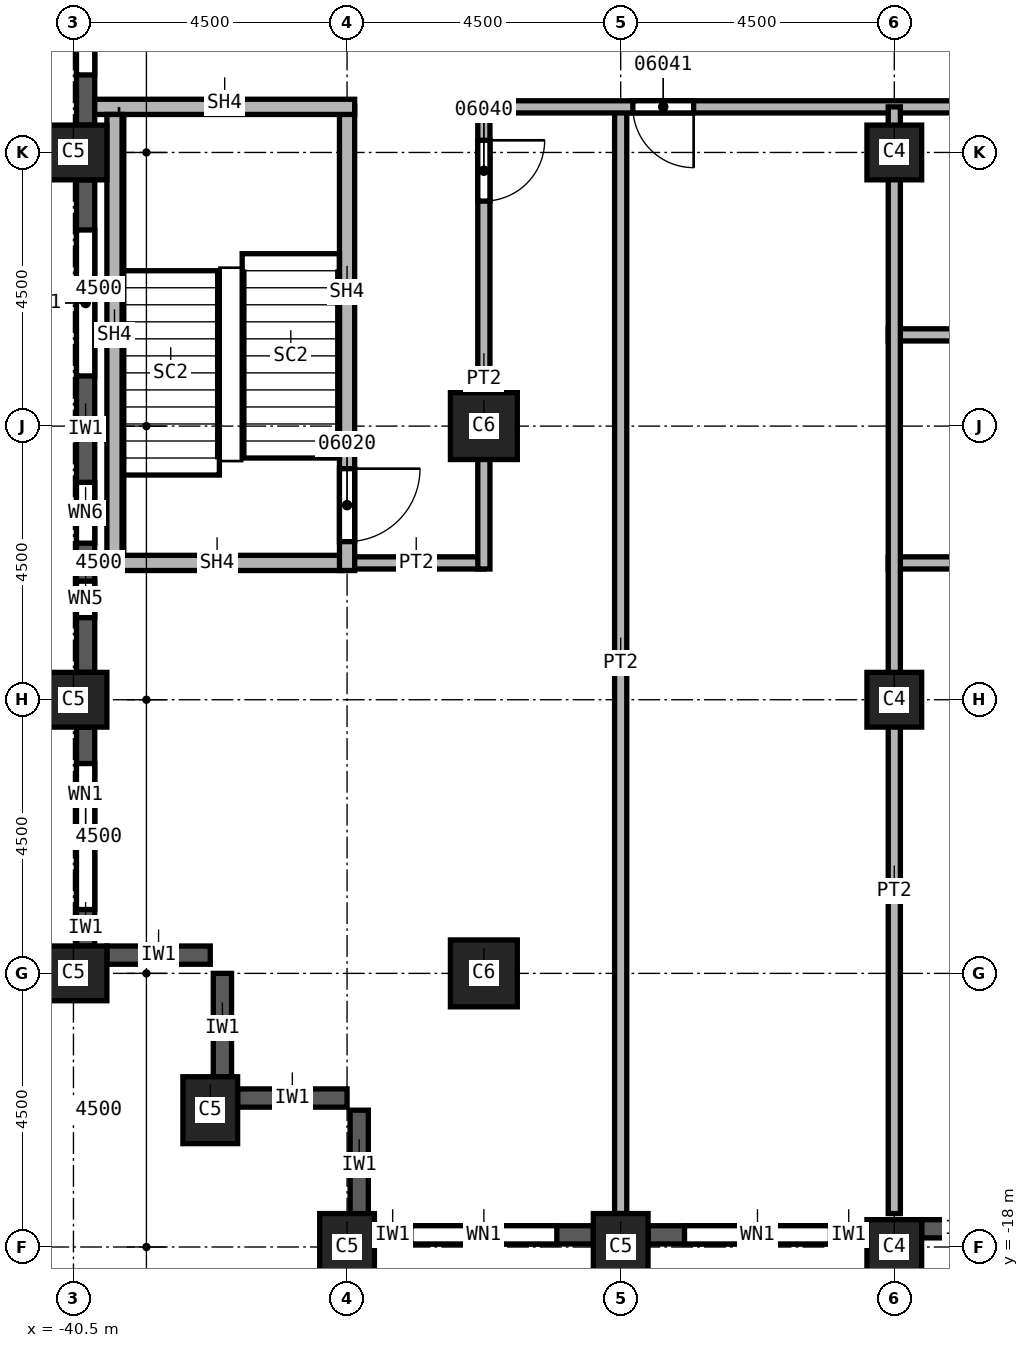
"""IFC4 building model, lengths in metres.
Left out: names, types, materials, properties, quantities, classifications, styles, units other than length and angle.
Written with IfcOpenShell. Run it as: python <this file> out.ifc"""

import sys

from ifc_helpers import new_model, si_unit, direction, frame, frame_2d, origin, origin_2d, place, context, subcontext, project, spatial, rectangle, extrude, element, fill, save


model = new_model("IFC4")
c1 = context("Model", 3, precision=1e-05, world=origin(), true_north=direction((0.0, 1.0)))
c2 = subcontext(c1, "Body", "Model", "MODEL_VIEW")
j1 = project(units=[si_unit("LENGTHUNIT", "METRE"), si_unit("PLANEANGLEUNIT", "RADIAN")], contexts=[c1])
p1 = place(None, origin())
s1 = spatial("IfcSite", under=j1, at=p1, CompositionType="ELEMENT")
p2 = place(p1, origin())
s2 = spatial("IfcBuilding", under=s1, at=p2, CompositionType="ELEMENT")
p3 = place(p2, frame((0.0, 0.0, 126.0)))
s3 = spatial("IfcBuildingStorey", under=s2, at=p3, CompositionType="ELEMENT", Elevation=126.0)
for number, where, z_axis, x_axis in (
    (1, (-40.5, 0.0, 0.0), (0.0, 0.0, 1.0), (0.0, 1.0, 0.0)),
    (2, (-40.5, -9.0, 0.0), (0.0, 0.0, 1.0), (0.0, 1.0, 0.0)),
    (3, (-40.5, -13.5, 0.0), (0.0, 0.0, 1.0), (0.0, 1.0, 0.0)),
    (4, (-38.25, -15.75, 0.0), (0.0, 0.0, 1.0), (1.0, 0.0, 0.0)),
    (5, (-31.5, -18.0, 0.0), (0.0, 0.0, 1.0), (1.0, 0.0, 0.0)),
    (6, (-36.0, -18.0, 0.0), (0.0, 0.0, 1.0), (1.0, 0.0, 0.0)),
):
    element("IfcColumn", number, at=place(p3, frame(where, z_axis=z_axis, x_axis=x_axis)), inside=s3, PredefinedType="COLUMN", context=c2, shape_type="SweptSolid", body=[
        extrude(rectangle(XDim=0.9, YDim=1.1, at=origin_2d()), origin(), (0.0, 0.0, 1.0), 3.7),
    ])
for number, where, z_axis, x_axis in (
    (7, (-33.75, -4.5, 0.0), (0.0, 0.0, 1.0), (1.0, 0.0, 0.0)),
    (8, (-33.75, -13.5, 0.0), (0.0, 0.0, 1.0), (1.0, 0.0, 0.0)),
):
    element("IfcColumn", number, at=place(p3, frame(where, z_axis=z_axis, x_axis=x_axis)), inside=s3, PredefinedType="COLUMN", context=c2, shape_type="SweptSolid", body=[
        extrude(rectangle(XDim=1.1, YDim=1.1, at=origin_2d()), origin(), (0.0, 0.0, 1.0), 3.7),
    ])
for number, where, z_axis, x_axis in (
    (9, (-27.0, 0.0, 0.0), (0.0, 0.0, 1.0), (1.0, 0.0, 0.0)),
    (10, (-27.0, -9.0, 0.0), (0.0, 0.0, 1.0), (1.0, 0.0, 0.0)),
    (11, (-27.0, -18.0, 0.0), (0.0, 0.0, 1.0), (1.0, 0.0, 0.0)),
):
    element("IfcColumn", number, at=place(p3, frame(where, z_axis=z_axis, x_axis=x_axis)), inside=s3, PredefinedType="COLUMN", context=c2, shape_type="SweptSolid", body=[
        extrude(rectangle(XDim=0.9, YDim=0.9, at=origin_2d()), origin(), (0.0, 0.0, 1.0), 3.7),
    ])
p4 = place(p3, frame((-39.95, -13.2, 0.0), z_axis=(0.0, 0.0, 1.0), x_axis=(1.0, 0.0, 0.0)))
e12 = element("IfcWall", 12, at=p4, inside=s3, PredefinedType="SOLIDWALL", context=c2, shape_type="SweptSolid", body=[
    extrude(rectangle(XDim=1.7, YDim=0.3, at=frame_2d((0.85, 0.0))), origin(), (0.0, 0.0, 1.0), 3.1),
])
for number, where, z_axis, x_axis in (
    (13, (-38.05, -15.3, 0.0), (0.0, 0.0, 1.0), (0.0, 1.0, 0.0)),
    (14, (-37.8, -15.55, 0.0), (0.0, 0.0, 1.0), (1.0, 0.0, 0.0)),
    (15, (-35.8, -17.55, 0.0), (0.0, 0.0, 1.0), (0.0, 1.0, 0.0)),
):
    element("IfcWall", number, at=place(p3, frame(where, z_axis=z_axis, x_axis=x_axis)), inside=s3, PredefinedType="SOLIDWALL", context=c2, shape_type="SweptSolid", body=[
        extrude(rectangle(XDim=1.8, YDim=0.3, at=frame_2d((0.9, 0.0))), origin(), (0.0, 0.0, 1.0), 3.1),
    ])
p5 = place(p3, frame((-40.3, 8.55, 0.0), z_axis=(0.0, 0.0, 1.0), x_axis=(0.0, -1.0, 0.0)))
e16 = element("IfcWall", 16, at=p5, inside=s3, PredefinedType="SOLIDWALL", context=c2, shape_type="SweptSolid", body=[
    extrude(rectangle(XDim=8.1, YDim=0.3, at=frame_2d((4.05, 0.0))), origin(), (0.0, 0.0, 1.0), 3.1),
])
p6 = place(p5, frame((0.825, 0.0, 0.8)))
e17 = element("IfcOpeningElement", 17, at=p6, cuts=e16, PredefinedType="OPENING", context=c2, shape_type="SweptSolid", body=[
    extrude(rectangle(XDim=2.4, YDim=1.95, at=frame_2d((1.2, 0.975))), frame((0.0, 0.15, 0.0), z_axis=(0.0, -1.0, 0.0), x_axis=(1.0, 0.0, 0.0)), (0.0, 0.0, 1.0), 0.3),
])
p7 = place(p5, frame((4.875, 0.0, 0.8)))
e18 = element("IfcOpeningElement", 18, at=p7, cuts=e16, PredefinedType="OPENING", context=c2, shape_type="SweptSolid", body=[
    extrude(rectangle(XDim=2.4, YDim=1.95, at=frame_2d((1.2, 0.975))), frame((0.0, 0.15, 0.0), z_axis=(0.0, -1.0, 0.0), x_axis=(1.0, 0.0, 0.0)), (0.0, 0.0, 1.0), 0.3),
])
p8 = place(p3, frame((-40.3, -0.45, 0.0), z_axis=(0.0, 0.0, 1.0), x_axis=(0.0, -1.0, 0.0)))
e19 = element("IfcWall", 19, at=p8, inside=s3, PredefinedType="SOLIDWALL", context=c2, shape_type="SweptSolid", body=[
    extrude(rectangle(XDim=8.1, YDim=0.3, at=frame_2d((4.05, 0.0))), origin(), (0.0, 0.0, 1.0), 3.1),
])
p9 = place(p8, frame((0.825, 0.0, 0.8)))
e20 = element("IfcOpeningElement", 20, at=p9, cuts=e19, PredefinedType="OPENING", context=c2, shape_type="SweptSolid", body=[
    extrude(rectangle(XDim=2.4, YDim=1.95, at=frame_2d((1.2, 0.975))), frame((0.0, 0.15, 0.0), z_axis=(0.0, -1.0, 0.0), x_axis=(1.0, 0.0, 0.0)), (0.0, 0.0, 1.0), 0.3),
])
p10 = place(p8, frame((4.975, 0.0, 0.8)))
e21 = element("IfcOpeningElement", 21, at=p10, cuts=e19, PredefinedType="OPENING", context=c2, shape_type="SweptSolid", body=[
    extrude(rectangle(XDim=1.0, YDim=1.95, at=frame_2d((0.5, 0.975))), frame((0.0, 0.15, 0.0), z_axis=(0.0, -1.0, 0.0), x_axis=(1.0, 0.0, 0.0)), (0.0, 0.0, 1.0), 0.3),
])
p11 = place(p8, frame((6.6, 0.0, 0.8)))
e22 = element("IfcOpeningElement", 22, at=p11, cuts=e19, PredefinedType="OPENING", context=c2, shape_type="SweptSolid", body=[
    extrude(rectangle(XDim=0.6, YDim=1.95, at=frame_2d((0.3, 0.975))), frame((0.0, 0.15, 0.0), z_axis=(0.0, -1.0, 0.0), x_axis=(1.0, 0.0, 0.0)), (0.0, 0.0, 1.0), 0.3),
])
p12 = place(p3, frame((-40.3, -9.45, 0.0), z_axis=(0.0, 0.0, 1.0), x_axis=(0.0, -1.0, 0.0)))
e23 = element("IfcWall", 23, at=p12, inside=s3, PredefinedType="SOLIDWALL", context=c2, shape_type="SweptSolid", body=[
    extrude(rectangle(XDim=3.6, YDim=0.3, at=frame_2d((1.8, 0.0))), origin(), (0.0, 0.0, 1.0), 3.1),
])
p13 = place(p12, frame((0.6, 0.0, 0.8)))
e24 = element("IfcOpeningElement", 24, at=p13, cuts=e23, PredefinedType="OPENING", context=c2, shape_type="SweptSolid", body=[
    extrude(rectangle(XDim=2.4, YDim=1.95, at=frame_2d((1.2, 0.975))), frame((0.0, 0.15, 0.0), z_axis=(0.0, -1.0, 0.0), x_axis=(1.0, 0.0, 0.0)), (0.0, 0.0, 1.0), 0.3),
])
p14 = place(p3, frame((-35.55, -17.8, 0.0), z_axis=(0.0, 0.0, 1.0), x_axis=(1.0, 0.0, 0.0)))
e25 = element("IfcWall", 25, at=p14, inside=s3, PredefinedType="SOLIDWALL", context=c2, shape_type="SweptSolid", body=[
    extrude(rectangle(XDim=3.6, YDim=0.3, at=frame_2d((1.8, 0.0))), origin(), (0.0, 0.0, 1.0), 3.1),
])
p15 = place(p14, frame((0.6, 0.0, 0.8)))
e26 = element("IfcOpeningElement", 26, at=p15, cuts=e25, PredefinedType="OPENING", context=c2, shape_type="SweptSolid", body=[
    extrude(rectangle(XDim=2.4, YDim=1.95, at=frame_2d((1.2, 0.975))), frame((0.0, 0.15, 0.0), z_axis=(0.0, -1.0, 0.0), x_axis=(1.0, 0.0, 0.0)), (0.0, 0.0, 1.0), 0.3),
])
p16 = place(p3, frame((-31.05, -17.8, 0.0), z_axis=(0.0, 0.0, 1.0), x_axis=(1.0, 0.0, 0.0)))
e27 = element("IfcWall", 27, at=p16, inside=s3, PredefinedType="SOLIDWALL", context=c2, shape_type="SweptSolid", body=[
    extrude(rectangle(XDim=3.6, YDim=0.3, at=frame_2d((1.8, 0.0))), origin(), (0.0, 0.0, 1.0), 3.1),
])
p17 = place(p16, frame((0.6, 0.0, 0.8)))
e28 = element("IfcOpeningElement", 28, at=p17, cuts=e27, PredefinedType="OPENING", context=c2, shape_type="SweptSolid", body=[
    extrude(rectangle(XDim=2.4, YDim=1.95, at=frame_2d((1.2, 0.975))), frame((0.0, 0.15, 0.0), z_axis=(0.0, -1.0, 0.0), x_axis=(1.0, 0.0, 0.0)), (0.0, 0.0, 1.0), 0.3),
])
p18 = place(p3, frame((-26.55, -17.7, 0.0), z_axis=(0.0, 0.0, 1.0), x_axis=(1.0, 0.0, 0.0)))
e29 = element("IfcWall", 29, at=p18, inside=s3, PredefinedType="SOLIDWALL", context=c2, shape_type="SweptSolid", body=[
    extrude(rectangle(XDim=1.35, YDim=0.3, at=frame_2d((0.675, 0.0))), origin(), (0.0, 0.0, 1.0), 3.1),
])
p19 = place(p3, frame((-33.75, -6.75, 0.0), z_axis=(0.0, 0.0, 1.0), x_axis=(-1.0, 0.0, 0.0)))
e30 = element("IfcWall", 30, at=p19, inside=s3, PredefinedType="PARTITIONING", context=c2, shape_type="SweptSolid", body=[
    extrude(rectangle(XDim=2.25, YDim=0.2, at=frame_2d((1.125, 0.0))), origin(), (0.0, 0.0, 1.0), 3.7),
])
p20 = place(p3, frame((-33.75, 0.75, 0.0), z_axis=(0.0, 0.0, 1.0), x_axis=(0.0, -1.0, 0.0)))
e31 = element("IfcWall", 31, at=p20, inside=s3, PredefinedType="PARTITIONING", context=c2, shape_type="SweptSolid", body=[
    extrude(rectangle(XDim=7.6, YDim=0.2, at=frame_2d((3.8, 0.0))), origin(), (0.0, 0.0, 1.0), 3.7),
])
p21 = place(p20, frame((0.55, 0.0, 0.0)))
e32 = element("IfcOpeningElement", 32, at=p21, cuts=e31, PredefinedType="OPENING", context=c2, shape_type="SweptSolid", body=[
    extrude(rectangle(XDim=1.0, YDim=2.1, at=frame_2d((0.5, 1.05))), frame((0.0, 0.1, 0.0), z_axis=(0.0, -1.0, 0.0), x_axis=(1.0, 0.0, 0.0)), (0.0, 0.0, 1.0), 0.2),
])
p22 = place(p3, frame((-31.5, 0.75, 0.0), z_axis=(0.0, 0.0, 1.0), x_axis=(0.0, -1.0, 0.0)))
e33 = element("IfcWall", 33, at=p22, inside=s3, PredefinedType="PARTITIONING", context=c2, shape_type="SweptSolid", body=[
    extrude(rectangle(XDim=18.2, YDim=0.2, at=frame_2d((9.1, 0.0))), origin(), (0.0, 0.0, 1.0), 3.7),
])
p23 = place(p3, frame((-15.4, 0.75, 0.0), z_axis=(0.0, 0.0, 1.0), x_axis=(-1.0, 0.0, 0.0)))
e34 = element("IfcWall", 34, at=p23, inside=s3, PredefinedType="PARTITIONING", context=c2, shape_type="SweptSolid", body=[
    extrude(rectangle(XDim=18.45, YDim=0.2, at=frame_2d((9.225, 0.0))), origin(), (0.0, 0.0, 1.0), 3.7),
])
p24 = place(p23, frame((3.55, 0.0, 0.0)))
e35 = element("IfcOpeningElement", 35, at=p24, cuts=e34, PredefinedType="OPENING", context=c2, shape_type="SweptSolid", body=[
    extrude(rectangle(XDim=1.0, YDim=2.1, at=frame_2d((0.5, 1.05))), frame((0.0, 0.1, 0.0), z_axis=(0.0, -1.0, 0.0), x_axis=(1.0, 0.0, 0.0)), (0.0, 0.0, 1.0), 0.2),
])
p25 = place(p23, frame((14.9, 0.0, 0.0)))
e36 = element("IfcOpeningElement", 36, at=p25, cuts=e34, PredefinedType="OPENING", context=c2, shape_type="SweptSolid", body=[
    extrude(rectangle(XDim=1.0, YDim=2.1, at=frame_2d((0.5, 1.05))), frame((0.0, 0.1, 0.0), z_axis=(0.0, -1.0, 0.0), x_axis=(1.0, 0.0, 0.0)), (0.0, 0.0, 1.0), 0.2),
])
for number, where, z_axis, x_axis in (
    (37, (-27.1, -6.75, 0.0), (0.0, 0.0, 1.0), (1.0, 0.0, 0.0)),
    (38, (-27.1, -3.0, 0.0), (0.0, 0.0, 1.0), (1.0, 0.0, 0.0)),
):
    element("IfcWall", number, at=place(p3, frame(where, z_axis=z_axis, x_axis=x_axis)), inside=s3, PredefinedType="PARTITIONING", context=c2, shape_type="SweptSolid", body=[
        extrude(rectangle(XDim=11.7, YDim=0.2, at=frame_2d((5.85, 0.0))), origin(), (0.0, 0.0, 1.0), 3.7),
    ])
p26 = place(p3, frame((-27.0, -17.45, 0.0), z_axis=(0.0, 0.0, 1.0), x_axis=(0.0, 1.0, 0.0)))
e39 = element("IfcWall", 39, at=p26, inside=s3, PredefinedType="PARTITIONING", context=c2, shape_type="SweptSolid", body=[
    extrude(rectangle(XDim=18.2, YDim=0.2, at=frame_2d((9.1, 0.0))), origin(), (0.0, 0.0, 1.0), 3.7),
])
p27 = place(p3, frame((-36.0, -6.75, 0.0), z_axis=(0.0, 0.0, 1.0), x_axis=(-1.0, 0.0, 0.0)))
e40 = element("IfcWall", 40, at=p27, inside=s3, PredefinedType="SOLIDWALL", context=c2, shape_type="SweptSolid", body=[
    extrude(rectangle(XDim=4.15, YDim=0.25, at=frame_2d((2.075, 0.0))), origin(), (0.0, 0.0, 1.0), 3.7),
])
p28 = place(p3, frame((-36.0, 0.75, 0.0), z_axis=(0.0, 0.0, 1.0), x_axis=(0.0, -1.0, 0.0)))
e41 = element("IfcWall", 41, at=p28, inside=s3, PredefinedType="SOLIDWALL", context=c2, shape_type="SweptSolid", body=[
    extrude(rectangle(XDim=7.625, YDim=0.25, at=frame_2d((3.812, 0.0))), origin(), (0.0, 0.0, 1.0), 3.7),
])
p29 = place(p28, frame((5.95, 0.0, 0.0)))
e42 = element("IfcOpeningElement", 42, at=p29, cuts=e41, PredefinedType="OPENING", context=c2, shape_type="SweptSolid", body=[
    extrude(rectangle(XDim=1.2, YDim=2.1, at=frame_2d((0.6, 1.05))), frame((0.0, 0.125, 0.0), z_axis=(0.0, -1.0, 0.0), x_axis=(1.0, 0.0, 0.0)), (0.0, 0.0, 1.0), 0.25),
])
p30 = place(p3, frame((-35.875, 0.75, 0.0), z_axis=(0.0, 0.0, 1.0), x_axis=(-1.0, 0.0, 0.0)))
e43 = element("IfcWall", 43, at=p30, inside=s3, PredefinedType="SOLIDWALL", context=c2, shape_type="SweptSolid", body=[
    extrude(rectangle(XDim=4.275, YDim=0.25, at=frame_2d((2.137, 0.0))), origin(), (0.0, 0.0, 1.0), 3.7),
])
p31 = place(p3, frame((-39.825, -6.625, 0.0), z_axis=(0.0, 0.0, 1.0), x_axis=(0.0, 1.0, 0.0)))
e44 = element("IfcWall", 44, at=p31, inside=s3, PredefinedType="SOLIDWALL", context=c2, shape_type="SweptSolid", body=[
    extrude(rectangle(XDim=7.25, YDim=0.25, at=frame_2d((3.625, 0.0))), origin(), (0.0, 0.0, 1.0), 3.7),
])
p32 = place(p7, origin())
e45 = element("IfcWindow", 45, at=p32, inside=s3, PartitioningType="SINGLE_PANEL", PredefinedType="WINDOW", context=c2, shape_type="SweptSolid", body=[
    extrude(rectangle(XDim=2.4, YDim=1.95, at=frame_2d((1.2, 0.975))), frame((0.0, 0.03, 0.0), z_axis=(0.0, -1.0, 0.0), x_axis=(1.0, 0.0, 0.0)), (0.0, 0.0, 1.0), 0.06),
])
fill(e18, e45)
p33 = place(p9, origin())
e46 = element("IfcWindow", 46, at=p33, inside=s3, PartitioningType="SINGLE_PANEL", PredefinedType="WINDOW", context=c2, shape_type="SweptSolid", body=[
    extrude(rectangle(XDim=2.4, YDim=1.95, at=frame_2d((1.2, 0.975))), frame((0.0, 0.03, 0.0), z_axis=(0.0, -1.0, 0.0), x_axis=(1.0, 0.0, 0.0)), (0.0, 0.0, 1.0), 0.06),
])
fill(e20, e46)
p34 = place(p13, origin())
e47 = element("IfcWindow", 47, at=p34, inside=s3, PartitioningType="SINGLE_PANEL", PredefinedType="WINDOW", context=c2, shape_type="SweptSolid", body=[
    extrude(rectangle(XDim=2.4, YDim=1.95, at=frame_2d((1.2, 0.975))), frame((0.0, 0.03, 0.0), z_axis=(0.0, -1.0, 0.0), x_axis=(1.0, 0.0, 0.0)), (0.0, 0.0, 1.0), 0.06),
])
fill(e24, e47)
p35 = place(p15, origin())
e48 = element("IfcWindow", 48, at=p35, inside=s3, PartitioningType="SINGLE_PANEL", PredefinedType="WINDOW", context=c2, shape_type="SweptSolid", body=[
    extrude(rectangle(XDim=2.4, YDim=1.95, at=frame_2d((1.2, 0.975))), frame((0.0, 0.03, 0.0), z_axis=(0.0, -1.0, 0.0), x_axis=(1.0, 0.0, 0.0)), (0.0, 0.0, 1.0), 0.06),
])
fill(e26, e48)
p36 = place(p17, origin())
e49 = element("IfcWindow", 49, at=p36, inside=s3, PartitioningType="SINGLE_PANEL", PredefinedType="WINDOW", context=c2, shape_type="SweptSolid", body=[
    extrude(rectangle(XDim=2.4, YDim=1.95, at=frame_2d((1.2, 0.975))), frame((0.0, 0.03, 0.0), z_axis=(0.0, -1.0, 0.0), x_axis=(1.0, 0.0, 0.0)), (0.0, 0.0, 1.0), 0.06),
])
fill(e28, e49)
p37 = place(p29, origin())
e50 = element("IfcDoor", 50, at=p37, inside=s3, OperationType="SINGLE_SWING_LEFT", PredefinedType="DOOR", context=c2, shape_type="SweptSolid", body=[
    extrude(rectangle(XDim=1.2, YDim=2.1, at=frame_2d((0.6, 1.05))), frame((0.0, 0.025, 0.0), z_axis=(0.0, -1.0, 0.0), x_axis=(1.0, 0.0, 0.0)), (0.0, 0.0, 1.0), 0.05),
])
fill(e42, e50)
p38 = place(p21, origin())
e51 = element("IfcDoor", 51, at=p38, inside=s3, OperationType="SINGLE_SWING_LEFT", PredefinedType="DOOR", context=c2, shape_type="SweptSolid", body=[
    extrude(rectangle(XDim=1.0, YDim=2.1, at=frame_2d((0.5, 1.05))), frame((0.0, 0.025, 0.0), z_axis=(0.0, -1.0, 0.0), x_axis=(1.0, 0.0, 0.0)), (0.0, 0.0, 1.0), 0.05),
])
fill(e32, e51)
p39 = place(p25, origin())
e52 = element("IfcDoor", 52, at=p39, inside=s3, OperationType="SINGLE_SWING_RIGHT", PredefinedType="DOOR", context=c2, shape_type="SweptSolid", body=[
    extrude(rectangle(XDim=1.0, YDim=2.1, at=frame_2d((0.5, 1.05))), frame((0.0, 0.025, 0.0), z_axis=(0.0, -1.0, 0.0), x_axis=(1.0, 0.0, 0.0)), (0.0, 0.0, 1.0), 0.05),
])
fill(e36, e52)
p40 = place(p10, origin())
e53 = element("IfcWindow", 53, at=p40, inside=s3, PartitioningType="SINGLE_PANEL", PredefinedType="WINDOW", context=c2, shape_type="SweptSolid", body=[
    extrude(rectangle(XDim=1.0, YDim=1.95, at=frame_2d((0.5, 0.975))), frame((0.0, 0.03, 0.0), z_axis=(0.0, -1.0, 0.0), x_axis=(1.0, 0.0, 0.0)), (0.0, 0.0, 1.0), 0.06),
])
fill(e21, e53)
p41 = place(p11, origin())
e54 = element("IfcWindow", 54, at=p41, inside=s3, PartitioningType="SINGLE_PANEL", PredefinedType="WINDOW", context=c2, shape_type="SweptSolid", body=[
    extrude(rectangle(XDim=0.6, YDim=1.95, at=frame_2d((0.3, 0.975))), frame((0.0, 0.03, 0.0), z_axis=(0.0, -1.0, 0.0), x_axis=(1.0, 0.0, 0.0)), (0.0, 0.0, 1.0), 0.06),
])
fill(e22, e54)
save(model, sys.argv[1])
